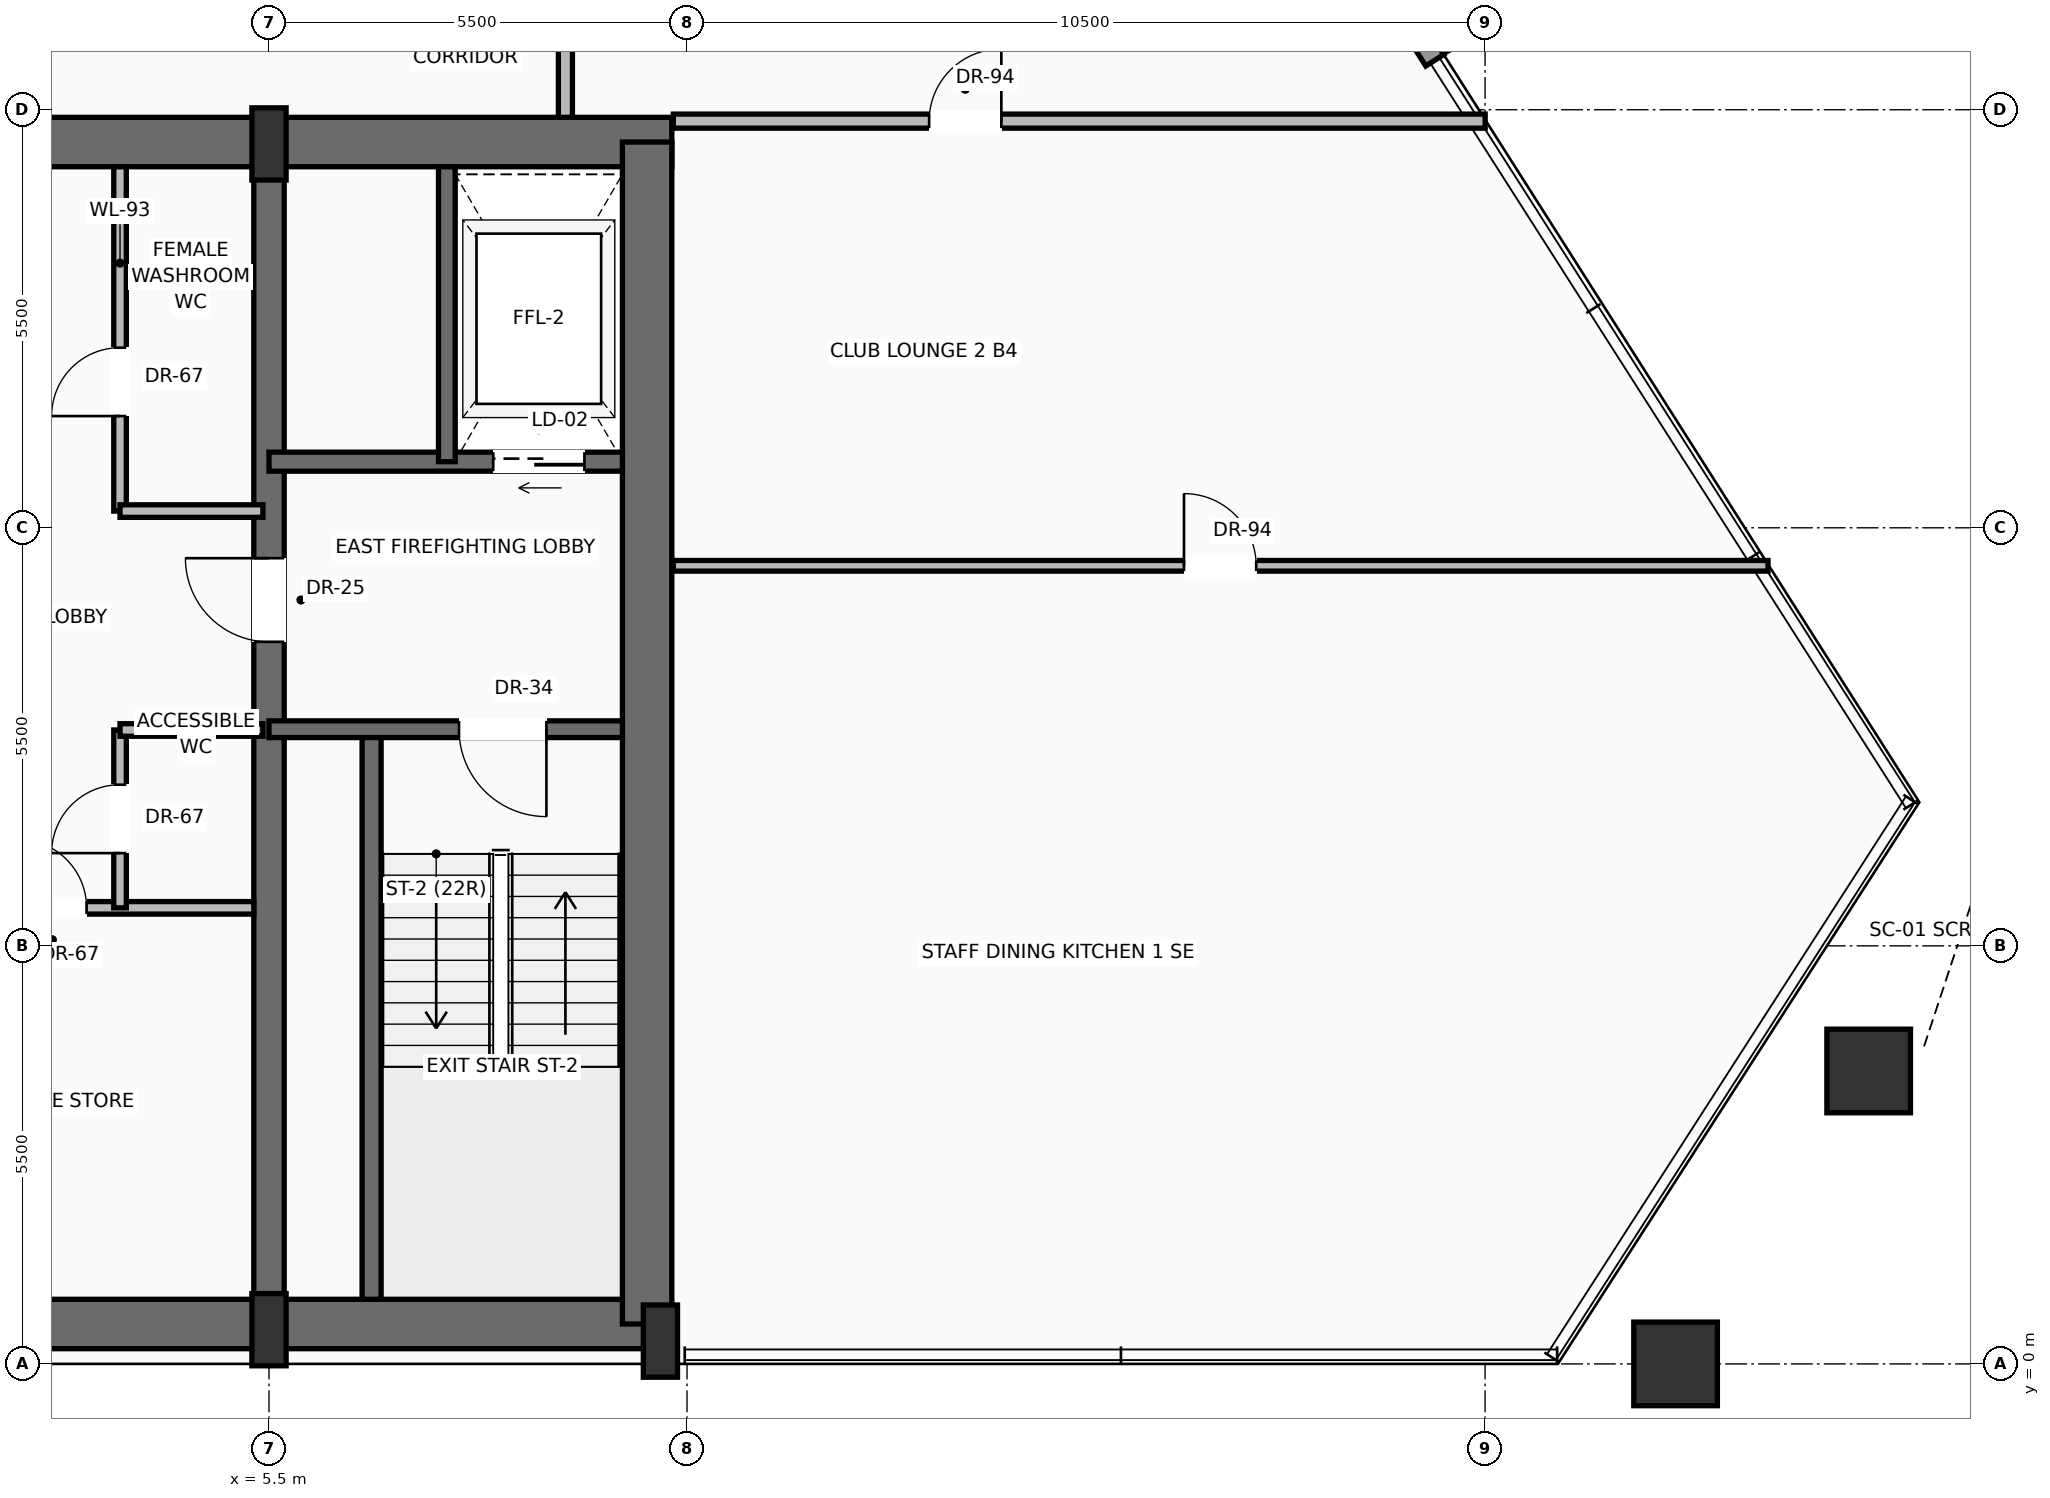
"""IFC4 building model, lengths in metres.
Left out: names, types, materials, properties, quantities, classifications, styles, units other than length and angle.
Written with IfcOpenShell. Run it as: python <this file> out.ifc"""

import sys

from ifc_helpers import new_model, si_unit, direction, frame, frame_2d, origin, origin_2d, place, context, subcontext, project, spatial, rectangle, hollow_rectangle, extrude, source, transform, mapped, element, fill, save


model = new_model("IFC4")
c1 = context("Model", 3, precision=1e-05, world=origin(), true_north=direction((0.0, 1.0)))
c2 = subcontext(c1, "Body", "Model", "MODEL_VIEW")
j1 = project(units=[si_unit("LENGTHUNIT", "METRE"), si_unit("PLANEANGLEUNIT", "RADIAN")], contexts=[c1])
p1 = place(None, origin())
s1 = spatial("IfcSite", under=j1, at=p1, CompositionType="ELEMENT")
p2 = place(p1, origin())
s2 = spatial("IfcBuilding", under=s1, at=p2, CompositionType="ELEMENT")
p3 = place(p2, frame((0.0, 0.0, 151.5)))
s3 = spatial("IfcBuildingStorey", under=s2, at=p3, CompositionType="ELEMENT", Elevation=151.5)
p4 = place(p3, frame((-10.65, 0.525, 0.0), z_axis=(0.0, 0.0, 1.0), x_axis=(1.0, 0.0, 0.0)))
e1 = element("IfcWall", 1, at=p4, inside=s3, PredefinedType="SHEAR", context=c2, shape_type="SweptSolid", body=[
    extrude(rectangle(XDim=21.3, YDim=0.65, at=frame_2d((10.65, 0.0))), origin(), (0.0, 0.0, 1.0), 3.47),
])
p5 = place(p3, frame((-10.8, 16.075, 0.0), z_axis=(0.0, 0.0, 1.0), x_axis=(1.0, 0.0, 0.0)))
e2 = element("IfcWall", 2, at=p5, inside=s3, PredefinedType="SHEAR", context=c2, shape_type="SweptSolid", body=[
    extrude(rectangle(XDim=21.6, YDim=0.65, at=frame_2d((10.8, 0.0))), origin(), (0.0, 0.0, 1.0), 3.47),
])
p6 = place(p5, frame((3.37, 0.0, 0.0)))
e3 = element("IfcOpeningElement", 3, at=p6, cuts=e2, PredefinedType="OPENING", context=c2, shape_type="SweptSolid", body=[
    extrude(rectangle(XDim=1.3, YDim=2.3, at=frame_2d((0.65, 1.15))), frame((0.0, 0.335, 0.0), z_axis=(0.0, -1.0, 0.0), x_axis=(1.0, 0.0, 0.0)), (0.0, 0.0, 1.0), 0.67),
])
p7 = place(p5, frame((9.8, 0.0, 0.0)))
e4 = element("IfcOpeningElement", 4, at=p7, cuts=e2, PredefinedType="OPENING", context=c2, shape_type="SweptSolid", body=[
    extrude(rectangle(XDim=2.0, YDim=2.4, at=frame_2d((1.0, 1.2))), frame((0.0, 0.335, 0.0), z_axis=(0.0, -1.0, 0.0), x_axis=(1.0, 0.0, 0.0)), (0.0, 0.0, 1.0), 0.67),
])
p8 = place(p3, frame((10.475, 0.525, 0.0), z_axis=(0.0, 0.0, 1.0), x_axis=(0.0, 1.0, 0.0)))
e5 = element("IfcWall", 5, at=p8, inside=s3, PredefinedType="SHEAR", context=c2, shape_type="SweptSolid", body=[
    extrude(rectangle(XDim=15.55, YDim=0.65, at=frame_2d((7.775, 0.0))), origin(), (0.0, 0.0, 1.0), 3.47),
])
p9 = place(p3, frame((5.5, 0.525, 0.0), z_axis=(0.0, 0.0, 1.0), x_axis=(0.0, 1.0, 0.0)))
e6 = element("IfcWall", 6, at=p9, inside=s3, PredefinedType="SHEAR", context=c2, shape_type="SweptSolid", body=[
    extrude(rectangle(XDim=15.55, YDim=0.4, at=frame_2d((7.775, 0.0))), origin(), (0.0, 0.0, 1.0), 3.47),
])
p10 = place(p9, frame((8.975, 0.0, 0.0)))
e7 = element("IfcOpeningElement", 7, at=p10, cuts=e6, PredefinedType="OPENING", context=c2, shape_type="SweptSolid", body=[
    extrude(rectangle(XDim=1.1, YDim=2.2, at=frame_2d((0.55, 1.1))), frame((0.0, 0.21, 0.0), z_axis=(0.0, -1.0, 0.0), x_axis=(1.0, 0.0, 0.0)), (0.0, 0.0, 1.0), 0.42),
])
m1 = source(origin(), c2, "Body", "SweptSolid", [
    extrude(rectangle(XDim=0.45, YDim=0.95, at=origin_2d()), origin(), (0.0, 0.0, 1.0), 3.7),
])
for number, where, z_axis, x_axis in (
    (8, (5.5, 0.45, 0.0), (0.0, 0.0, 1.0), (1.0, 0.0, 0.0)),
    (9, (10.65, 0.3, 0.0), (0.0, 0.0, 1.0), (1.0, 0.0, 0.0)),
    (10, (5.5, 16.05, 0.0), (0.0, 0.0, 1.0), (1.0, 0.0, 0.0)),
):
    element("IfcColumn", number, at=place(p3, frame(where, z_axis=z_axis, x_axis=x_axis)), inside=s3, PredefinedType="PILASTER", context=c2, shape_type="MappedRepresentation", body=[
        mapped(m1, transform((0.0, 0.0, 0.0), scale=1.0)),
    ])
m2 = source(origin(), c2, "Body", "SweptSolid", [
    extrude(hollow_rectangle(XDim=1.1, YDim=1.1, WallThickness=0.055, at=origin_2d()), origin(), (0.0, 0.0, 1.0), 3.691),
])
p11 = place(p3, frame((24.006, 0.0, 0.004), z_axis=(0.007870647139, 0.0, 0.999969025977), x_axis=(0.0, 1.0, 0.0)))
e11 = element("IfcColumn", 11, at=p11, inside=s3, PredefinedType="COLUMN", context=c2, shape_type="MappedRepresentation", body=[
    mapped(m2, transform((0.0, 0.0, 0.0), scale=1.0)),
])
m3 = source(origin(), c2, "Body", "SweptSolid", [
    extrude(hollow_rectangle(XDim=1.1, YDim=1.1, WallThickness=0.055, at=origin_2d()), origin(), (0.0, 0.0, 1.0), 3.692),
])
p12 = place(p3, frame((26.547, 3.854, 0.004), z_axis=(-0.004430958279, -0.015144618595, 0.999875495818), x_axis=(0.959764960395, -0.280804595399, 0.0)))
e12 = element("IfcColumn", 12, at=p12, inside=s3, PredefinedType="COLUMN", context=c2, shape_type="MappedRepresentation", body=[
    mapped(m3, transform((0.0, 0.0, 0.0), scale=1.0)),
])
p13 = place(p3, frame((11.004, 32.607, 0.0), z_axis=(0.0, 0.0, 1.0), x_axis=(0.536776323973, -0.843724586593, 0.0)))
e13 = element("IfcWall", 13, at=p13, inside=s3, PredefinedType="SOLIDWALL", context=c2, shape_type="SweptSolid", body=[
    extrude(rectangle(XDim=18.32, YDim=0.28, at=frame_2d((9.16, 0.0))), origin(), (0.0, 0.0, 1.0), 3.05),
])
p14 = place(p13, frame((4.397, 0.0, 0.0)))
e14 = element("IfcOpeningElement", 14, at=p14, cuts=e13, PredefinedType="OPENING", context=c2, shape_type="SweptSolid", body=[
    extrude(rectangle(XDim=1.6, YDim=2.35, at=frame_2d((0.8, 1.175))), frame((0.0, 0.15, 0.0), z_axis=(0.0, -1.0, 0.0), x_axis=(1.0, 0.0, 0.0)), (0.0, 0.0, 1.0), 0.3),
])
p15 = place(p13, frame((12.458, 0.0, 0.9)))
e15 = element("IfcOpeningElement", 15, at=p15, cuts=e13, PredefinedType="OPENING", context=c2, shape_type="SweptSolid", body=[
    extrude(rectangle(XDim=2.0, YDim=1.85, at=frame_2d((1.0, 0.925))), frame((0.0, 0.15, 0.0), z_axis=(0.0, -1.0, 0.0), x_axis=(1.0, 0.0, 0.0)), (0.0, 0.0, 1.0), 0.3),
])
p16 = place(p3, frame((6.85, 0.85, 0.0), z_axis=(0.0, 0.0, 1.0), x_axis=(0.0, 1.0, 0.0)))
e16 = element("IfcWall", 16, at=p16, inside=s3, PredefinedType="SOLIDWALL", context=c2, shape_type="SweptSolid", body=[
    extrude(rectangle(XDim=7.5, YDim=0.25, at=frame_2d((3.75, 0.0))), origin(), (0.0, 0.0, 1.0), 3.47),
])
p17 = place(p3, frame((10.15, 8.35, 0.0), z_axis=(0.0, 0.0, 1.0), x_axis=(-1.0, 0.0, 0.0)))
e17 = element("IfcWall", 17, at=p17, inside=s3, PredefinedType="SOLIDWALL", context=c2, shape_type="SweptSolid", body=[
    extrude(rectangle(XDim=4.65, YDim=0.22, at=frame_2d((2.325, 0.0))), origin(), (0.0, 0.0, 1.0), 3.47),
])
p18 = place(p17, frame((1.0, 0.0, 0.0)))
e18 = element("IfcOpeningElement", 18, at=p18, cuts=e17, PredefinedType="OPENING", context=c2, shape_type="SweptSolid", body=[
    extrude(rectangle(XDim=1.15, YDim=2.2, at=frame_2d((0.575, 1.1))), frame((0.0, 0.12, 0.0), z_axis=(0.0, -1.0, 0.0), x_axis=(1.0, 0.0, 0.0)), (0.0, 0.0, 1.0), 0.24),
])
p19 = place(p3, frame((10.15, 11.87, 0.0), z_axis=(0.0, 0.0, 1.0), x_axis=(-1.0, 0.0, 0.0)))
e19 = element("IfcWall", 19, at=p19, inside=s3, PredefinedType="SOLIDWALL", context=c2, shape_type="SweptSolid", body=[
    extrude(rectangle(XDim=4.65, YDim=0.25, at=frame_2d((2.325, 0.0))), origin(), (0.0, 0.0, 1.0), 3.47),
])
p20 = place(p19, frame((0.5, 0.0, 0.0)))
e20 = element("IfcOpeningElement", 20, at=p20, cuts=e19, PredefinedType="OPENING", context=c2, shape_type="SweptSolid", body=[
    extrude(rectangle(XDim=1.2, YDim=2.25, at=frame_2d((0.6, 1.125))), frame((0.0, 0.135, 0.0), z_axis=(0.0, -1.0, 0.0), x_axis=(1.0, 0.0, 0.0)), (0.0, 0.0, 1.0), 0.27),
])
p21 = place(p3, frame((7.84, 11.87, 0.0), z_axis=(0.0, 0.0, 1.0), x_axis=(0.0, 1.0, 0.0)))
e21 = element("IfcWall", 21, at=p21, inside=s3, PredefinedType="SOLIDWALL", context=c2, shape_type="SweptSolid", body=[
    extrude(rectangle(XDim=3.88, YDim=0.22, at=frame_2d((1.94, 0.0))), origin(), (0.0, 0.0, 1.0), 3.47),
])
p22 = place(p3, frame((1.82, 6.0, 0.0), z_axis=(0.0, 0.0, 1.0), x_axis=(1.0, 0.0, 0.0)))
e22 = element("IfcWall", 22, at=p22, inside=s3, PredefinedType="PARTITIONING", context=c2, shape_type="SweptSolid", body=[
    extrude(rectangle(XDim=3.48, YDim=0.165, at=frame_2d((1.74, 0.0))), origin(), (0.0, 0.0, 1.0), 3.462),
])
p23 = place(p22, frame((0.38, 0.0, 0.0)))
e23 = element("IfcOpeningElement", 23, at=p23, cuts=e22, PredefinedType="OPENING", context=c2, shape_type="SweptSolid", body=[
    extrude(rectangle(XDim=0.9, YDim=2.1, at=frame_2d((0.45, 1.05))), frame((0.0, 0.093, 0.0), z_axis=(0.0, -1.0, 0.0), x_axis=(1.0, 0.0, 0.0)), (0.0, 0.0, 1.0), 0.185),
])
p24 = place(p3, frame((3.54, 6.0, 0.0), z_axis=(0.0, 0.0, 1.0), x_axis=(0.0, 1.0, 0.0)))
e24 = element("IfcWall", 24, at=p24, inside=s3, PredefinedType="PARTITIONING", context=c2, shape_type="SweptSolid", body=[
    extrude(rectangle(XDim=2.34, YDim=0.165, at=frame_2d((1.17, 0.0))), origin(), (0.0, 0.0, 1.0), 3.462),
])
p25 = place(p24, frame((0.72, 0.0, 0.0)))
e25 = element("IfcOpeningElement", 25, at=p25, cuts=e24, PredefinedType="OPENING", context=c2, shape_type="SweptSolid", body=[
    extrude(rectangle(XDim=0.9, YDim=2.1, at=frame_2d((0.45, 1.05))), frame((0.0, 0.093, 0.0), z_axis=(0.0, -1.0, 0.0), x_axis=(1.0, 0.0, 0.0)), (0.0, 0.0, 1.0), 0.185),
])
p26 = place(p3, frame((3.54, 8.34, 0.0), z_axis=(0.0, 0.0, 1.0), x_axis=(1.0, 0.0, 0.0)))
e26 = element("IfcWall", 26, at=p26, inside=s3, PredefinedType="PARTITIONING", context=c2, shape_type="SweptSolid", body=[
    extrude(rectangle(XDim=1.88, YDim=0.165, at=frame_2d((0.94, 0.0))), origin(), (0.0, 0.0, 1.0), 3.462),
])
p27 = place(p3, frame((3.54, 11.22, 0.0), z_axis=(0.0, 0.0, 1.0), x_axis=(0.0, 1.0, 0.0)))
e27 = element("IfcWall", 27, at=p27, inside=s3, PredefinedType="PARTITIONING", context=c2, shape_type="SweptSolid", body=[
    extrude(rectangle(XDim=4.53, YDim=0.165, at=frame_2d((2.265, 0.0))), origin(), (0.0, 0.0, 1.0), 3.462),
])
p28 = place(p27, frame((1.25, 0.0, 0.0)))
e28 = element("IfcOpeningElement", 28, at=p28, cuts=e27, PredefinedType="OPENING", context=c2, shape_type="SweptSolid", body=[
    extrude(rectangle(XDim=0.9, YDim=2.1, at=frame_2d((0.45, 1.05))), frame((0.0, 0.093, 0.0), z_axis=(0.0, -1.0, 0.0), x_axis=(1.0, 0.0, 0.0)), (0.0, 0.0, 1.0), 0.185),
])
p29 = place(p3, frame((3.54, 11.22, 0.0), z_axis=(0.0, 0.0, 1.0), x_axis=(1.0, 0.0, 0.0)))
e29 = element("IfcWall", 29, at=p29, inside=s3, PredefinedType="PARTITIONING", context=c2, shape_type="SweptSolid", body=[
    extrude(rectangle(XDim=1.88, YDim=0.165, at=frame_2d((0.94, 0.0))), origin(), (0.0, 0.0, 1.0), 3.462),
])
p30 = place(p3, frame((9.4, 16.4, 0.0), z_axis=(0.0, 0.0, 1.0), x_axis=(0.0, 1.0, 0.0)))
e30 = element("IfcWall", 30, at=p30, inside=s3, PredefinedType="PARTITIONING", context=c2, shape_type="SweptSolid", body=[
    extrude(rectangle(XDim=8.8, YDim=0.185, at=frame_2d((4.4, 0.0))), origin(), (0.0, 0.0, 1.0), 2.846),
])
p31 = place(p30, frame((4.331, 0.0, 0.0)))
e31 = element("IfcOpeningElement", 31, at=p31, cuts=e30, PredefinedType="OPENING", context=c2, shape_type="SweptSolid", body=[
    extrude(rectangle(XDim=0.95, YDim=2.2, at=frame_2d((0.475, 1.1))), frame((0.0, 0.103, 0.0), z_axis=(0.0, -1.0, 0.0), x_axis=(1.0, 0.0, 0.0)), (0.0, 0.0, 1.0), 0.205),
])
p32 = place(p3, frame((10.82, 16.35, 0.0), z_axis=(0.0, 0.0, 1.0), x_axis=(1.0, 0.0, 0.0)))
e32 = element("IfcWall", 32, at=p32, inside=s3, PredefinedType="PARTITIONING", context=c2, shape_type="SweptSolid", body=[
    extrude(rectangle(XDim=10.681, YDim=0.185, at=frame_2d((5.341, 0.0))), origin(), (0.0, 0.0, 1.0), 3.462),
])
p33 = place(p32, frame((3.365, 0.0, 0.0)))
e33 = element("IfcOpeningElement", 33, at=p33, cuts=e32, PredefinedType="OPENING", context=c2, shape_type="SweptSolid", body=[
    extrude(rectangle(XDim=0.95, YDim=2.2, at=frame_2d((0.475, 1.1))), frame((0.0, 0.103, 0.0), z_axis=(0.0, -1.0, 0.0), x_axis=(1.0, 0.0, 0.0)), (0.0, 0.0, 1.0), 0.205),
])
p34 = place(p3, frame((10.82, 10.5, 0.0), z_axis=(0.0, 0.0, 1.0), x_axis=(1.0, 0.0, 0.0)))
e34 = element("IfcWall", 34, at=p34, inside=s3, PredefinedType="PARTITIONING", context=c2, shape_type="SweptSolid", body=[
    extrude(rectangle(XDim=14.403, YDim=0.14, at=frame_2d((7.201, 0.0))), origin(), (0.0, 0.0, 1.0), 3.462),
])
p35 = place(p34, frame((6.719, 0.0, 0.0)))
e35 = element("IfcOpeningElement", 35, at=p35, cuts=e34, PredefinedType="OPENING", context=c2, shape_type="SweptSolid", body=[
    extrude(rectangle(XDim=0.95, YDim=2.2, at=frame_2d((0.475, 1.1))), frame((0.0, 0.08, 0.0), z_axis=(0.0, -1.0, 0.0), x_axis=(1.0, 0.0, 0.0)), (0.0, 0.0, 1.0), 0.16),
])
m4 = source(origin(), c2, "Body", "SweptSolid", [
    extrude(rectangle(XDim=1.15, YDim=2.2, at=frame_2d((0.575, 1.1))), frame((0.0, 0.025, 0.0), z_axis=(0.0, -1.0, 0.0), x_axis=(1.0, 0.0, 0.0)), (0.0, 0.0, 1.0), 0.05),
])
p36 = place(p18, origin())
e36 = element("IfcDoor", 36, at=p36, inside=s3, OperationType="SINGLE_SWING_LEFT", PredefinedType="DOOR", context=c2, shape_type="MappedRepresentation", body=[
    mapped(m4, transform((0.0, 0.0, 0.0), scale=1.0)),
])
fill(e18, e36)
m5 = source(origin(), c2, "Body", "SweptSolid", [
    extrude(rectangle(XDim=1.1, YDim=2.2, at=frame_2d((0.55, 1.1))), frame((0.0, 0.025, 0.0), z_axis=(0.0, -1.0, 0.0), x_axis=(1.0, 0.0, 0.0)), (0.0, 0.0, 1.0), 0.05),
])
p37 = place(p10, origin())
e37 = element("IfcDoor", 37, at=p37, inside=s3, OperationType="SINGLE_SWING_RIGHT", PredefinedType="DOOR", context=c2, shape_type="MappedRepresentation", body=[
    mapped(m5, transform((0.0, 0.0, 0.0), scale=1.0)),
])
fill(e7, e37)
m6 = source(origin(), c2, "Body", "SweptSolid", [
    extrude(rectangle(XDim=1.2, YDim=2.25, at=frame_2d((0.6, 1.125))), frame((0.0, 0.025, 0.0), z_axis=(0.0, -1.0, 0.0), x_axis=(1.0, 0.0, 0.0)), (0.0, 0.0, 1.0), 0.05),
])
p38 = place(p20, origin())
e38 = element("IfcDoor", 38, at=p38, inside=s3, OperationType="SLIDING_TO_RIGHT", PredefinedType="DOOR", context=c2, shape_type="MappedRepresentation", body=[
    mapped(m6, transform((0.0, 0.0, 0.0), scale=1.0)),
])
fill(e20, e38)
m7 = source(origin(), c2, "Body", "SweptSolid", [
    extrude(rectangle(XDim=0.9, YDim=2.1, at=frame_2d((0.45, 1.05))), frame((0.0, 0.025, 0.0), z_axis=(0.0, -1.0, 0.0), x_axis=(1.0, 0.0, 0.0)), (0.0, 0.0, 1.0), 0.05),
])
p39 = place(p23, origin())
e39 = element("IfcDoor", 39, at=p39, inside=s3, OperationType="SINGLE_SWING_LEFT", PredefinedType="DOOR", context=c2, shape_type="MappedRepresentation", body=[
    mapped(m7, transform((0.0, 0.0, 0.0), scale=1.0)),
])
fill(e23, e39)
p40 = place(p25, origin())
e40 = element("IfcDoor", 40, at=p40, inside=s3, OperationType="SINGLE_SWING_LEFT", PredefinedType="DOOR", context=c2, shape_type="MappedRepresentation", body=[
    mapped(m7, transform((0.0, 0.0, 0.0), scale=1.0)),
])
fill(e25, e40)
p41 = place(p28, origin())
e41 = element("IfcDoor", 41, at=p41, inside=s3, OperationType="SINGLE_SWING_LEFT", PredefinedType="DOOR", context=c2, shape_type="MappedRepresentation", body=[
    mapped(m7, transform((0.0, 0.0, 0.0), scale=1.0)),
])
fill(e28, e41)
m8 = source(origin(), c2, "Body", "SweptSolid", [
    extrude(rectangle(XDim=0.95, YDim=2.2, at=frame_2d((0.475, 1.1))), frame((0.0, 0.025, 0.0), z_axis=(0.0, -1.0, 0.0), x_axis=(1.0, 0.0, 0.0)), (0.0, 0.0, 1.0), 0.05),
])
p42 = place(p33, origin())
e42 = element("IfcDoor", 42, at=p42, inside=s3, OperationType="SINGLE_SWING_RIGHT", PredefinedType="DOOR", context=c2, shape_type="MappedRepresentation", body=[
    mapped(m8, transform((0.0, 0.0, 0.0), scale=1.0)),
])
fill(e33, e42)
p43 = place(p35, origin())
e43 = element("IfcDoor", 43, at=p43, inside=s3, OperationType="SINGLE_SWING_LEFT", PredefinedType="DOOR", context=c2, shape_type="MappedRepresentation", body=[
    mapped(m8, transform((0.0, 0.0, 0.0), scale=1.0)),
])
fill(e35, e43)
save(model, sys.argv[1])
